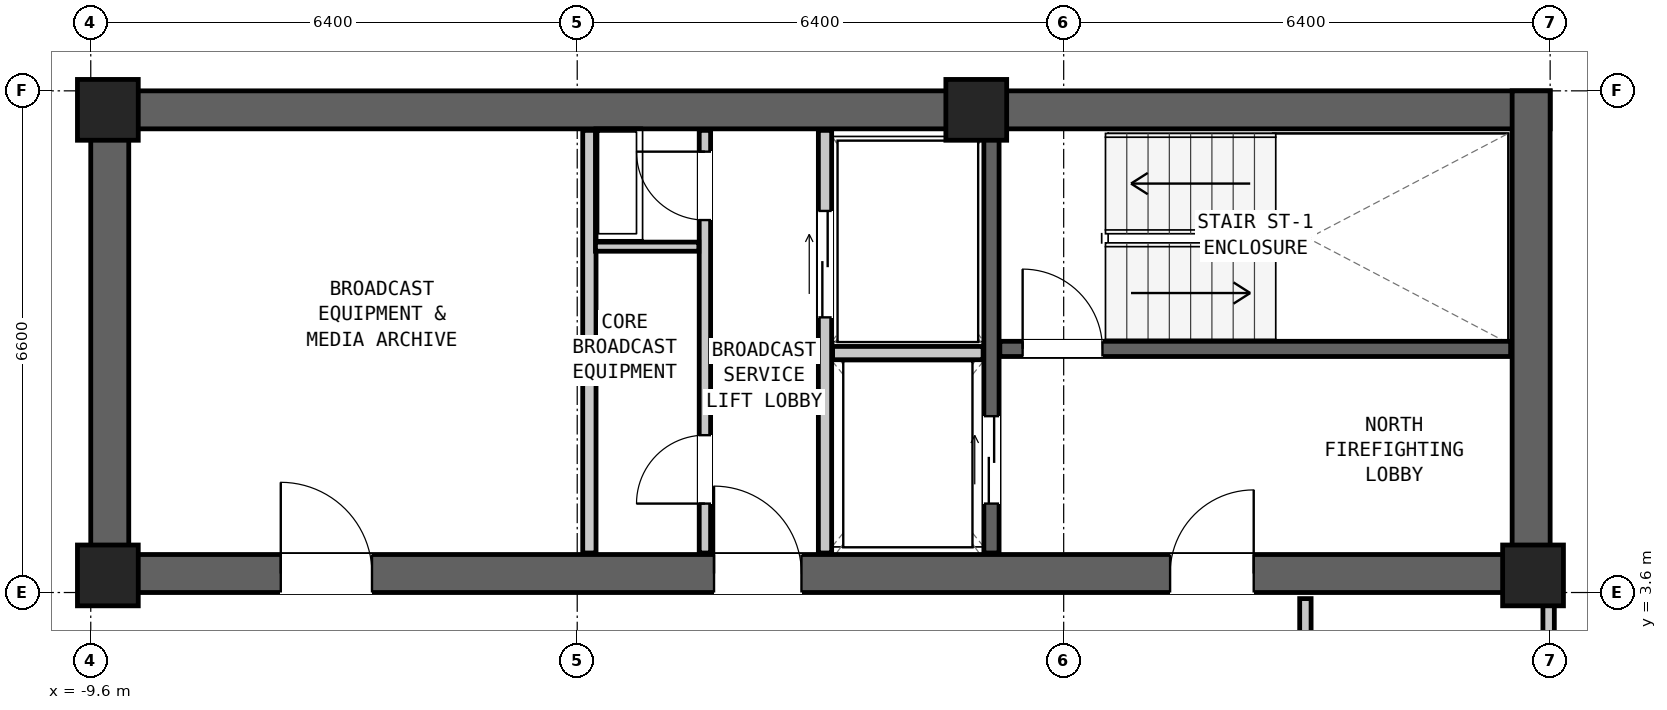
"""IFC4 building model, lengths in metres.
Left out: names, types, materials, properties, quantities, classifications, styles, units other than length and angle.
Written with IfcOpenShell. Run it as: python <this file> out.ifc"""

import sys

from ifc_helpers import new_model, si_unit, direction, frame, frame_2d, origin, origin_2d, place, context, subcontext, project, spatial, rectangle, extrude, element, fill, save


model = new_model("IFC4")
c1 = context("Model", 3, precision=1e-05, world=origin(), true_north=direction((0.0, 1.0)))
c2 = subcontext(c1, "Body", "Model", "MODEL_VIEW")
j1 = project(units=[si_unit("LENGTHUNIT", "METRE"), si_unit("PLANEANGLEUNIT", "RADIAN")], contexts=[c1])
p1 = place(None, origin())
s1 = spatial("IfcSite", under=j1, at=p1, CompositionType="ELEMENT")
p2 = place(p1, origin())
s2 = spatial("IfcBuilding", under=s1, at=p2, CompositionType="ELEMENT")
p3 = place(p2, frame((0.0, 0.0, 112.8)))
s3 = spatial("IfcBuildingStorey", under=s2, at=p3, CompositionType="ELEMENT", Elevation=112.8)
p4 = place(p3, frame((-9.6, 9.95, 0.0), z_axis=(0.0, 0.0, 1.0), x_axis=(1.0, 0.0, 0.0)))
e1 = element("IfcWall", 1, at=p4, inside=s3, PredefinedType="SHEAR", context=c2, shape_type="SweptSolid", body=[
    extrude(rectangle(XDim=19.2, YDim=0.5, at=frame_2d((9.6, 0.0))), origin(), (0.0, 0.0, 1.0), 3.05),
])
p5 = place(p3, frame((-9.6, 3.85, 0.0), z_axis=(0.0, 0.0, 1.0), x_axis=(1.0, 0.0, 0.0)))
e2 = element("IfcWall", 2, at=p5, inside=s3, PredefinedType="SHEAR", context=c2, shape_type="SweptSolid", body=[
    extrude(rectangle(XDim=19.2, YDim=0.5, at=frame_2d((9.6, 0.0))), origin(), (0.0, 0.0, 1.0), 3.05),
])
p6 = place(p5, frame((14.2, 0.0, 0.0)))
e3 = element("IfcOpeningElement", 3, at=p6, cuts=e2, PredefinedType="OPENING", context=c2, shape_type="SweptSolid", body=[
    extrude(rectangle(XDim=1.1, YDim=2.08, at=frame_2d((0.55, 1.04))), frame((0.0, 0.262, 0.0), z_axis=(0.0, -1.0, 0.0), x_axis=(1.0, 0.0, 0.0)), (0.0, 0.0, 1.0), 0.524),
])
p7 = place(p5, frame((8.2, 0.0, 0.0)))
e4 = element("IfcOpeningElement", 4, at=p7, cuts=e2, PredefinedType="OPENING", context=c2, shape_type="SweptSolid", body=[
    extrude(rectangle(XDim=1.15, YDim=2.1, at=frame_2d((0.575, 1.05))), frame((0.0, 0.262, 0.0), z_axis=(0.0, -1.0, 0.0), x_axis=(1.0, 0.0, 0.0)), (0.0, 0.0, 1.0), 0.524),
])
p8 = place(p5, frame((2.5, 0.0, 0.0)))
e5 = element("IfcOpeningElement", 5, at=p8, cuts=e2, PredefinedType="OPENING", context=c2, shape_type="SweptSolid", body=[
    extrude(rectangle(XDim=1.2, YDim=2.1, at=frame_2d((0.6, 1.05))), frame((0.0, 0.262, 0.0), z_axis=(0.0, -1.0, 0.0), x_axis=(1.0, 0.0, 0.0)), (0.0, 0.0, 1.0), 0.524),
])
for number, where, z_axis, x_axis in (
    (6, (-9.35, 3.6, 0.0), (0.0, 0.0, 1.0), (0.0, 1.0, 0.0)),
    (7, (9.35, 3.6, 0.0), (0.0, 0.0, 1.0), (0.0, 1.0, 0.0)),
):
    element("IfcWall", number, at=place(p3, frame(where, z_axis=z_axis, x_axis=x_axis)), inside=s3, PredefinedType="SHEAR", context=c2, shape_type="SweptSolid", body=[
        extrude(rectangle(XDim=6.6, YDim=0.5, at=frame_2d((3.3, 0.0))), origin(), (0.0, 0.0, 1.0), 3.05),
    ])
for number, where, z_axis, x_axis in (
    (8, (-9.375, 9.95, 0.0), (0.0, 0.0, 1.0), (1.0, 0.0, 0.0)),
    (9, (2.05, 9.95, 0.0), (0.0, 0.0, 1.0), (1.0, 0.0, 0.0)),
    (10, (-9.375, 3.825, 0.0), (0.0, 0.0, 1.0), (1.0, 0.0, 0.0)),
    (11, (9.375, 3.825, 0.0), (0.0, 0.0, 1.0), (1.0, 0.0, 0.0)),
):
    element("IfcColumn", number, at=place(p3, frame(where, z_axis=z_axis, x_axis=x_axis)), inside=s3, PredefinedType="COLUMN", context=c2, shape_type="SweptSolid", body=[
        extrude(rectangle(XDim=0.8, YDim=0.8, at=origin_2d()), origin(), (0.0, 0.0, 1.0), 3.05),
    ])
p9 = place(p3, frame((2.36, 6.805, 0.0), z_axis=(0.0, 0.0, 1.0), x_axis=(1.0, 0.0, 0.0)))
e12 = element("IfcWall", 12, at=p9, inside=s3, PredefinedType="SHEAR", context=c2, shape_type="SweptSolid", body=[
    extrude(rectangle(XDim=6.72, YDim=0.2, at=frame_2d((3.36, 0.0))), origin(), (0.0, 0.0, 1.0), 2.83),
])
p10 = place(p9, frame((0.3, 0.0, 0.0)))
e13 = element("IfcOpeningElement", 13, at=p10, cuts=e12, PredefinedType="OPENING", context=c2, shape_type="SweptSolid", body=[
    extrude(rectangle(XDim=1.05, YDim=2.08, at=frame_2d((0.525, 1.04))), frame((0.0, 0.112, 0.0), z_axis=(0.0, -1.0, 0.0), x_axis=(1.0, 0.0, 0.0)), (0.0, 0.0, 1.0), 0.224),
])
p11 = place(p3, frame((2.25, 4.12, 0.0), z_axis=(0.0, 0.0, 1.0), x_axis=(0.0, 1.0, 0.0)))
e14 = element("IfcWall", 14, at=p11, inside=s3, PredefinedType="SHEAR", context=c2, shape_type="SweptSolid", body=[
    extrude(rectangle(XDim=5.56, YDim=0.2, at=frame_2d((2.78, 0.0))), origin(), (0.0, 0.0, 1.0), 2.83),
])
p12 = place(p11, frame((0.65, 0.0, 0.0)))
e15 = element("IfcOpeningElement", 15, at=p12, cuts=e14, PredefinedType="OPENING", context=c2, shape_type="SweptSolid", body=[
    extrude(rectangle(XDim=1.15, YDim=2.08, at=frame_2d((0.575, 1.04))), frame((0.0, 0.112, 0.0), z_axis=(0.0, -1.0, 0.0), x_axis=(1.0, 0.0, 0.0)), (0.0, 0.0, 1.0), 0.224),
])
p13 = place(p3, frame((0.06, 4.12, 0.0), z_axis=(0.0, 0.0, 1.0), x_axis=(0.0, 1.0, 0.0)))
e16 = element("IfcWall", 16, at=p13, inside=s3, PredefinedType="PARTITIONING", context=c2, shape_type="SweptSolid", body=[
    extrude(rectangle(XDim=5.56, YDim=0.175, at=frame_2d((2.78, 0.0))), origin(), (0.0, 0.0, 1.0), 2.83),
])
p14 = place(p13, frame((3.1, 0.0, 0.0)))
e17 = element("IfcOpeningElement", 17, at=p14, cuts=e16, PredefinedType="OPENING", context=c2, shape_type="SweptSolid", body=[
    extrude(rectangle(XDim=1.4, YDim=2.12, at=frame_2d((0.7, 1.06))), frame((0.0, 0.1, 0.0), z_axis=(0.0, -1.0, 0.0), x_axis=(1.0, 0.0, 0.0)), (0.0, 0.0, 1.0), 0.199),
])
p15 = place(p3, frame((0.16, 6.75, 0.0), z_axis=(0.0, 0.0, 1.0), x_axis=(1.0, 0.0, 0.0)))
e18 = element("IfcWall", 18, at=p15, inside=s3, PredefinedType="PARTITIONING", context=c2, shape_type="SweptSolid", body=[
    extrude(rectangle(XDim=1.98, YDim=0.175, at=frame_2d((0.99, 0.0))), origin(), (0.0, 0.0, 1.0), 2.83),
])
p16 = place(p3, frame((-3.04, 4.12, 0.0), z_axis=(0.0, 0.0, 1.0), x_axis=(0.0, 1.0, 0.0)))
e19 = element("IfcWall", 19, at=p16, inside=s3, PredefinedType="PARTITIONING", context=c2, shape_type="SweptSolid", body=[
    extrude(rectangle(XDim=5.56, YDim=0.175, at=frame_2d((2.78, 0.0))), origin(), (0.0, 0.0, 1.0), 2.83),
])
p17 = place(p3, frame((-1.52, 4.12, 0.0), z_axis=(0.0, 0.0, 1.0), x_axis=(0.0, 1.0, 0.0)))
e20 = element("IfcWall", 20, at=p17, inside=s3, PredefinedType="PARTITIONING", context=c2, shape_type="SweptSolid", body=[
    extrude(rectangle(XDim=5.56, YDim=0.15, at=frame_2d((2.78, 0.0))), origin(), (0.0, 0.0, 1.0), 2.83),
])
p18 = place(p17, frame((4.38, 0.0, 0.0)))
e21 = element("IfcOpeningElement", 21, at=p18, cuts=e20, PredefinedType="OPENING", context=c2, shape_type="SweptSolid", body=[
    extrude(rectangle(XDim=0.9, YDim=2.05, at=frame_2d((0.45, 1.025))), frame((0.0, 0.087, 0.0), z_axis=(0.0, -1.0, 0.0), x_axis=(1.0, 0.0, 0.0)), (0.0, 0.0, 1.0), 0.174),
])
p19 = place(p17, frame((0.65, 0.0, 0.0)))
e22 = element("IfcOpeningElement", 22, at=p19, cuts=e20, PredefinedType="OPENING", context=c2, shape_type="SweptSolid", body=[
    extrude(rectangle(XDim=0.9, YDim=2.05, at=frame_2d((0.45, 1.025))), frame((0.0, 0.087, 0.0), z_axis=(0.0, -1.0, 0.0), x_axis=(1.0, 0.0, 0.0)), (0.0, 0.0, 1.0), 0.174),
])
p20 = place(p3, frame((-2.96, 8.15, 0.0), z_axis=(0.0, 0.0, 1.0), x_axis=(1.0, 0.0, 0.0)))
e23 = element("IfcWall", 23, at=p20, inside=s3, PredefinedType="PARTITIONING", context=c2, shape_type="SweptSolid", body=[
    extrude(rectangle(XDim=1.36, YDim=0.12, at=frame_2d((0.68, 0.0))), origin(), (0.0, 0.0, 1.0), 2.83),
])
p21 = place(p3, frame((6.38, -2.32, 0.0), z_axis=(0.0, 0.0, 1.0), x_axis=(0.0, 1.0, 0.0)))
e24 = element("IfcWall", 24, at=p21, inside=s3, PredefinedType="PARTITIONING", context=c2, shape_type="SweptSolid", body=[
    extrude(rectangle(XDim=5.84, YDim=0.15, at=frame_2d((2.92, 0.0))), origin(), (0.0, 0.0, 1.0), 2.198),
])
p22 = place(p3, frame((9.58, -2.32, 0.0), z_axis=(0.0, 0.0, 1.0), x_axis=(0.0, 1.0, 0.0)))
e25 = element("IfcWall", 25, at=p22, inside=s3, PredefinedType="PARTITIONING", context=c2, shape_type="SweptSolid", body=[
    extrude(rectangle(XDim=5.84, YDim=0.15, at=frame_2d((2.92, 0.0))), origin(), (0.0, 0.0, 1.0), 2.198),
])
p23 = place(p22, frame((2.445, 0.0, 0.0)))
e26 = element("IfcOpeningElement", 26, at=p23, cuts=e25, PredefinedType="OPENING", context=c2, shape_type="SweptSolid", body=[
    extrude(rectangle(XDim=0.95, YDim=2.1, at=frame_2d((0.475, 1.05))), frame((0.0, 0.087, 0.0), z_axis=(0.0, -1.0, 0.0), x_axis=(1.0, 0.0, 0.0)), (0.0, 0.0, 1.0), 0.174),
])
p24 = place(p10, origin())
e27 = element("IfcDoor", 27, at=p24, inside=s3, OperationType="SINGLE_SWING_LEFT", PredefinedType="DOOR", context=c2, shape_type="SweptSolid", body=[
    extrude(rectangle(XDim=1.05, YDim=2.08, at=frame_2d((0.525, 1.04))), frame((0.0, 0.025, 0.0), z_axis=(0.0, -1.0, 0.0), x_axis=(1.0, 0.0, 0.0)), (0.0, 0.0, 1.0), 0.05),
])
fill(e13, e27)
p25 = place(p6, origin())
e28 = element("IfcDoor", 28, at=p25, inside=s3, OperationType="SINGLE_SWING_RIGHT", PredefinedType="DOOR", context=c2, shape_type="SweptSolid", body=[
    extrude(rectangle(XDim=1.1, YDim=2.08, at=frame_2d((0.55, 1.04))), frame((0.0, 0.025, 0.0), z_axis=(0.0, -1.0, 0.0), x_axis=(1.0, 0.0, 0.0)), (0.0, 0.0, 1.0), 0.05),
])
fill(e3, e28)
p26 = place(p12, origin())
e29 = element("IfcDoor", 29, at=p26, inside=s3, OperationType="DOUBLE_DOOR_SLIDING", PredefinedType="DOOR", context=c2, shape_type="SweptSolid", body=[
    extrude(rectangle(XDim=1.15, YDim=2.08, at=frame_2d((0.575, 1.04))), frame((0.0, 0.025, 0.0), z_axis=(0.0, -1.0, 0.0), x_axis=(1.0, 0.0, 0.0)), (0.0, 0.0, 1.0), 0.05),
])
fill(e15, e29)
p27 = place(p14, origin())
e30 = element("IfcDoor", 30, at=p27, inside=s3, OperationType="DOUBLE_DOOR_SLIDING", PredefinedType="DOOR", context=c2, shape_type="SweptSolid", body=[
    extrude(rectangle(XDim=1.4, YDim=2.12, at=frame_2d((0.7, 1.06))), frame((0.0, 0.025, 0.0), z_axis=(0.0, -1.0, 0.0), x_axis=(1.0, 0.0, 0.0)), (0.0, 0.0, 1.0), 0.05),
])
fill(e17, e30)
p28 = place(p7, origin())
e31 = element("IfcDoor", 31, at=p28, inside=s3, OperationType="SINGLE_SWING_LEFT", PredefinedType="DOOR", context=c2, shape_type="SweptSolid", body=[
    extrude(rectangle(XDim=1.15, YDim=2.1, at=frame_2d((0.575, 1.05))), frame((0.0, 0.025, 0.0), z_axis=(0.0, -1.0, 0.0), x_axis=(1.0, 0.0, 0.0)), (0.0, 0.0, 1.0), 0.05),
])
fill(e4, e31)
p29 = place(p18, origin())
e32 = element("IfcDoor", 32, at=p29, inside=s3, OperationType="SINGLE_SWING_RIGHT", PredefinedType="DOOR", context=c2, shape_type="SweptSolid", body=[
    extrude(rectangle(XDim=0.9, YDim=2.05, at=frame_2d((0.45, 1.025))), frame((0.0, 0.025, 0.0), z_axis=(0.0, -1.0, 0.0), x_axis=(1.0, 0.0, 0.0)), (0.0, 0.0, 1.0), 0.05),
])
fill(e21, e32)
p30 = place(p19, origin())
e33 = element("IfcDoor", 33, at=p30, inside=s3, OperationType="SINGLE_SWING_LEFT", PredefinedType="DOOR", context=c2, shape_type="SweptSolid", body=[
    extrude(rectangle(XDim=0.9, YDim=2.05, at=frame_2d((0.45, 1.025))), frame((0.0, 0.025, 0.0), z_axis=(0.0, -1.0, 0.0), x_axis=(1.0, 0.0, 0.0)), (0.0, 0.0, 1.0), 0.05),
])
fill(e22, e33)
p31 = place(p8, origin())
e34 = element("IfcDoor", 34, at=p31, inside=s3, OperationType="SINGLE_SWING_LEFT", PredefinedType="DOOR", context=c2, shape_type="SweptSolid", body=[
    extrude(rectangle(XDim=1.2, YDim=2.1, at=frame_2d((0.6, 1.05))), frame((0.0, 0.025, 0.0), z_axis=(0.0, -1.0, 0.0), x_axis=(1.0, 0.0, 0.0)), (0.0, 0.0, 1.0), 0.05),
])
fill(e5, e34)
save(model, sys.argv[1])
